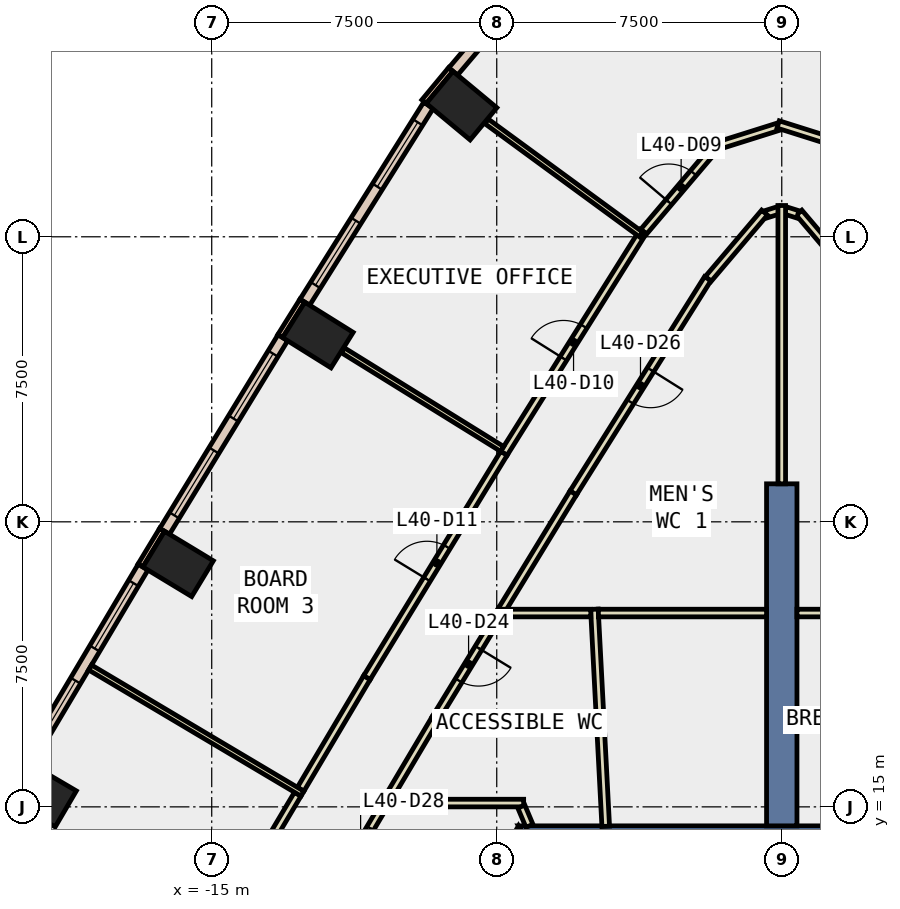
"""IFC4 building model, lengths in metres.
Left out: names, types, materials, properties, quantities, classifications, styles, units other than length and angle.
Written with IfcOpenShell. Run it as: python <this file> out.ifc"""

import sys

from ifc_helpers import new_model, si_unit, direction, frame, frame_2d, origin, origin_2d, place, context, subcontext, project, spatial, polyline, rectangle, outline, extrude, element, fill, save


model = new_model("IFC4")
c1 = context("Model", 3, precision=1e-05, world=origin(), true_north=direction((0.0, 1.0)))
c2 = subcontext(c1, "Body", "Model", "MODEL_VIEW")
j1 = project(units=[si_unit("LENGTHUNIT", "METRE"), si_unit("PLANEANGLEUNIT", "RADIAN")], contexts=[c1])
p1 = place(None, origin())
s1 = spatial("IfcSite", under=j1, at=p1, CompositionType="ELEMENT")
p2 = place(p1, origin())
s2 = spatial("IfcBuilding", under=s1, at=p2, CompositionType="ELEMENT")
p3 = place(p2, frame((0.0, 0.0, 180.2)))
s3 = spatial("IfcBuildingStorey", under=s2, at=p3, CompositionType="ELEMENT", Elevation=180.2)
for number, where, z_axis, x_axis in (
    (1, (-8.426, 33.452, -0.4), (0.0, 0.0, 1.0), (0.639, 0.769, 0.0)),
    (2, (-12.206, 27.416, -0.4), (0.0, 0.0, 1.0), (0.53, 0.848, 0.0)),
    (3, (-15.884, 21.393, -0.4), (0.0, 0.0, 1.0), (0.518, 0.855, 0.0)),
    (4, (-19.488, 15.326, -0.4), (0.0, 0.0, 1.0), (0.506, 0.863, 0.0)),
):
    element("IfcColumn", number, at=place(p3, frame(where, z_axis=z_axis, x_axis=x_axis)), inside=s3, PredefinedType="COLUMN", context=c2, shape_type="SweptSolid", body=[
        extrude(rectangle(XDim=1.1, YDim=1.5, at=origin_2d()), origin(), (0.0, 0.0, 1.0), 4.0),
    ])
p4 = place(p3, frame((0.0, 0.0, -0.4)))
e5 = element("IfcWall", 5, at=p4, inside=s3, PredefinedType="SHEAR", context=c2, shape_type="SweptSolid", body=[
    extrude(outline(polyline([(6.928, 14.5), (-6.928, 14.5), (-6.351, 13.5), (6.351, 13.5), (6.928, 14.5)])), origin(), (0.0, 0.0, 1.0), 4.0),
])
p5 = place(p3, frame((0.0, 0.0, -0.4)))
e6 = element("IfcWall", 6, at=p5, inside=s3, PredefinedType="SHEAR", context=c2, shape_type="SweptSolid", body=[
    extrude(outline(polyline([(-12.267, 5.252), (-11.402, 4.752), (-6.351, 13.5), (-6.928, 14.5), (-12.267, 5.252)])), origin(), (0.0, 0.0, 1.0), 4.0),
])
p6 = place(p3, frame((0.0, 14.5, -0.4), z_axis=(0.0, 0.0, 1.0), x_axis=(0.0, 1.0, 0.0)))
e7 = element("IfcWall", 7, at=p6, inside=s3, PredefinedType="SHEAR", context=c2, shape_type="SweptSolid", body=[
    extrude(rectangle(XDim=9.0, YDim=0.8, at=frame_2d((4.5, 0.0))), origin(), (0.0, 0.0, 1.0), 4.0),
])
p7 = place(p3, frame((-8.709, 34.402, 0.0), z_axis=(0.0, 0.0, 1.0), x_axis=(-0.639092407347, -0.769129959676, 0.0)))
e8 = element("IfcWall", 8, at=p7, inside=s3, PredefinedType="STANDARD", context=c2, shape_type="SweptSolid", body=[
    extrude(rectangle(XDim=1.1, YDim=0.15, at=frame_2d((0.55, 0.0))), origin(), (0.0, 0.0, 1.0), 3.6),
])
p8 = place(p3, frame((-12.614, 28.32, 0.0), z_axis=(0.0, 0.0, 1.0), x_axis=(-0.529879262372, -0.848073090782, 0.0)))
e9 = element("IfcWall", 9, at=p8, inside=s3, PredefinedType="STANDARD", context=c2, shape_type="SweptSolid", body=[
    extrude(rectangle(XDim=1.1, YDim=0.15, at=frame_2d((0.55, 0.0))), origin(), (0.0, 0.0, 1.0), 3.6),
])
p9 = place(p3, frame((-16.305, 22.291, 0.0), z_axis=(0.0, 0.0, 1.0), x_axis=(-0.518178754102, -0.855272341888, 0.0)))
e10 = element("IfcWall", 10, at=p9, inside=s3, PredefinedType="STANDARD", context=c2, shape_type="SweptSolid", body=[
    extrude(rectangle(XDim=1.1, YDim=0.15, at=frame_2d((0.55, 0.0))), origin(), (0.0, 0.0, 1.0), 3.6),
])
p10 = place(p3, frame((-5.889, 37.599, 0.0), z_axis=(0.0, 0.0, 1.0), x_axis=(-0.647156077277, -0.76235753531, 0.0)))
e11 = element("IfcWall", 11, at=p10, inside=s3, PredefinedType="STANDARD", context=c2, shape_type="SweptSolid", body=[
    extrude(rectangle(XDim=4.262, YDim=0.3, at=frame_2d((2.131, 0.0))), origin(), (0.0, 0.0, 1.0), 3.6),
])
p11 = place(p10, frame((1.431, 0.0, 0.9)))
e12 = element("IfcOpeningElement", 12, at=p11, cuts=e11, PredefinedType="OPENING", context=c2, shape_type="SweptSolid", body=[
    extrude(rectangle(XDim=1.4, YDim=2.6, at=frame_2d((0.7, 1.3))), frame((0.0, 0.16, 0.0), z_axis=(0.0, -1.0, 0.0), x_axis=(1.0, 0.0, 0.0)), (0.0, 0.0, 1.0), 0.32),
])
p12 = place(p3, frame((-9.296, 33.461, 0.0), z_axis=(0.0, 0.0, 1.0), x_axis=(-0.531816047834, -0.846859900613, 0.0)))
e13 = element("IfcWall", 13, at=p12, inside=s3, PredefinedType="STANDARD", context=c2, shape_type="SweptSolid", body=[
    extrude(rectangle(XDim=6.119, YDim=0.3, at=frame_2d((3.06, 0.0))), origin(), (0.0, 0.0, 1.0), 3.6),
])
p13 = place(p12, frame((0.53, 0.0, 0.9)))
e14 = element("IfcOpeningElement", 14, at=p13, cuts=e13, PredefinedType="OPENING", context=c2, shape_type="SweptSolid", body=[
    extrude(rectangle(XDim=2.0, YDim=2.6, at=frame_2d((1.0, 1.3))), frame((0.0, 0.16, 0.0), z_axis=(0.0, -1.0, 0.0), x_axis=(1.0, 0.0, 0.0)), (0.0, 0.0, 1.0), 0.32),
])
p14 = place(p12, frame((3.589, 0.0, 0.9)))
e15 = element("IfcOpeningElement", 15, at=p14, cuts=e13, PredefinedType="OPENING", context=c2, shape_type="SweptSolid", body=[
    extrude(rectangle(XDim=2.0, YDim=2.6, at=frame_2d((1.0, 1.3))), frame((0.0, 0.16, 0.0), z_axis=(0.0, -1.0, 0.0), x_axis=(1.0, 0.0, 0.0)), (0.0, 0.0, 1.0), 0.32),
])
p15 = place(p3, frame((-13.128, 27.345, 0.0), z_axis=(0.0, 0.0, 1.0), x_axis=(-0.521263083766, -0.8533960379, 0.0)))
e16 = element("IfcWall", 16, at=p15, inside=s3, PredefinedType="STANDARD", context=c2, shape_type="SweptSolid", body=[
    extrude(rectangle(XDim=5.97, YDim=0.3, at=frame_2d((2.985, 0.0))), origin(), (0.0, 0.0, 1.0), 3.6),
])
p16 = place(p15, frame((0.493, 0.0, 0.9)))
e17 = element("IfcOpeningElement", 17, at=p16, cuts=e16, PredefinedType="OPENING", context=c2, shape_type="SweptSolid", body=[
    extrude(rectangle(XDim=2.0, YDim=2.6, at=frame_2d((1.0, 1.3))), frame((0.0, 0.16, 0.0), z_axis=(0.0, -1.0, 0.0), x_axis=(1.0, 0.0, 0.0)), (0.0, 0.0, 1.0), 0.32),
])
p17 = place(p15, frame((3.478, 0.0, 0.9)))
e18 = element("IfcOpeningElement", 18, at=p17, cuts=e16, PredefinedType="OPENING", context=c2, shape_type="SweptSolid", body=[
    extrude(rectangle(XDim=2.0, YDim=2.6, at=frame_2d((1.0, 1.3))), frame((0.0, 0.16, 0.0), z_axis=(0.0, -1.0, 0.0), x_axis=(1.0, 0.0, 0.0)), (0.0, 0.0, 1.0), 0.32),
])
p18 = place(p3, frame((-16.806, 21.309, 0.0), z_axis=(0.0, 0.0, 1.0), x_axis=(-0.510653096173, -0.859786842984, 0.0)))
e19 = element("IfcWall", 19, at=p18, inside=s3, PredefinedType="STANDARD", context=c2, shape_type="SweptSolid", body=[
    extrude(rectangle(XDim=5.969, YDim=0.3, at=frame_2d((2.984, 0.0))), origin(), (0.0, 0.0, 1.0), 3.6),
])
p19 = place(p18, frame((0.492, 0.0, 0.9)))
e20 = element("IfcOpeningElement", 20, at=p19, cuts=e19, PredefinedType="OPENING", context=c2, shape_type="SweptSolid", body=[
    extrude(rectangle(XDim=2.0, YDim=2.6, at=frame_2d((1.0, 1.3))), frame((0.0, 0.16, 0.0), z_axis=(0.0, -1.0, 0.0), x_axis=(1.0, 0.0, 0.0)), (0.0, 0.0, 1.0), 0.32),
])
p20 = place(p18, frame((3.477, 0.0, 0.9)))
e21 = element("IfcOpeningElement", 21, at=p20, cuts=e19, PredefinedType="OPENING", context=c2, shape_type="SweptSolid", body=[
    extrude(rectangle(XDim=2.0, YDim=2.6, at=frame_2d((1.0, 1.3))), frame((0.0, 0.16, 0.0), z_axis=(0.0, -1.0, 0.0), x_axis=(1.0, 0.0, 0.0)), (0.0, 0.0, 1.0), 0.32),
])
p21 = place(p3, frame((-10.484, 15.014, 0.0), z_axis=(0.0, 0.0, 1.0), x_axis=(-0.510627855782, -0.859801833506, 0.0)))
e22 = element("IfcWall", 22, at=p21, inside=s3, PredefinedType="PARTITIONING", context=c2, shape_type="SweptSolid", body=[
    extrude(rectangle(XDim=2.342, YDim=0.2, at=frame_2d((1.171, 0.0))), origin(), (0.0, 0.0, 1.0), 3.6),
])
p22 = place(p21, frame((0.671, 0.0, 0.0)))
e23 = element("IfcOpeningElement", 23, at=p22, cuts=e22, PredefinedType="OPENING", context=c2, shape_type="SweptSolid", body=[
    extrude(rectangle(XDim=1.0, YDim=2.1, at=frame_2d((0.5, 1.05))), frame((0.0, 0.11, 0.0), z_axis=(0.0, -1.0, 0.0), x_axis=(1.0, 0.0, 0.0)), (0.0, 0.0, 1.0), 0.22),
])
p23 = place(p3, frame((-7.365, 20.185, 0.0), z_axis=(0.0, 0.0, 1.0), x_axis=(-0.521352973407, -0.853341125881, 0.0)))
e24 = element("IfcWall", 24, at=p23, inside=s3, PredefinedType="PARTITIONING", context=c2, shape_type="SweptSolid", body=[
    extrude(rectangle(XDim=3.359, YDim=0.2, at=frame_2d((1.679, 0.0))), origin(), (0.0, 0.0, 1.0), 3.6),
])
p24 = place(p23, frame((1.18, 0.0, 0.0)))
e25 = element("IfcOpeningElement", 25, at=p24, cuts=e24, PredefinedType="OPENING", context=c2, shape_type="SweptSolid", body=[
    extrude(rectangle(XDim=1.0, YDim=2.1, at=frame_2d((0.5, 1.05))), frame((0.0, 0.11, 0.0), z_axis=(0.0, -1.0, 0.0), x_axis=(1.0, 0.0, 0.0)), (0.0, 0.0, 1.0), 0.22),
])
p25 = place(p3, frame((-9.116, 17.319, 0.0), z_axis=(0.0, 0.0, 1.0), x_axis=(-0.510422773569, -0.859923596735, 0.0)))
e26 = element("IfcWall", 26, at=p25, inside=s3, PredefinedType="PARTITIONING", context=c2, shape_type="SweptSolid", body=[
    extrude(rectangle(XDim=2.48, YDim=0.2, at=frame_2d((1.24, 0.0))), origin(), (0.0, 0.0, 1.0), 3.6),
])
p26 = place(p3, frame((1.936, 28.89, 0.0), z_axis=(0.0, 0.0, 1.0), x_axis=(-0.647388540773, 0.762160138866, 0.0)))
e27 = element("IfcWall", 27, at=p26, inside=s3, PredefinedType="PARTITIONING", context=c2, shape_type="SweptSolid", body=[
    extrude(rectangle(XDim=2.291, YDim=0.2, at=frame_2d((1.146, 0.0))), origin(), (0.0, 0.0, 1.0), 3.6),
])
p27 = place(p3, frame((0.423, 30.59, 0.0), z_axis=(0.0, 0.0, 1.0), x_axis=(-0.954074901128, 0.29956816092, 0.0)))
e28 = element("IfcWall", 28, at=p27, inside=s3, PredefinedType="PARTITIONING", context=c2, shape_type="SweptSolid", body=[
    extrude(rectangle(XDim=0.344, YDim=0.2, at=frame_2d((0.172, 0.0))), origin(), (0.0, 0.0, 1.0), 3.6),
])
p28 = place(p3, frame((-0.048, 30.708, 0.0), z_axis=(0.0, 0.0, 1.0), x_axis=(-0.953948026088, -0.299971937891, 0.0)))
e29 = element("IfcWall", 29, at=p28, inside=s3, PredefinedType="PARTITIONING", context=c2, shape_type="SweptSolid", body=[
    extrude(rectangle(XDim=0.393, YDim=0.2, at=frame_2d((0.197, 0.0))), origin(), (0.0, 0.0, 1.0), 3.6),
])
p29 = place(p3, frame((-0.453, 30.636, 0.0), z_axis=(0.0, 0.0, 1.0), x_axis=(-0.647388540773, -0.762160138866, 0.0)))
e30 = element("IfcWall", 30, at=p29, inside=s3, PredefinedType="PARTITIONING", context=c2, shape_type="SweptSolid", body=[
    extrude(rectangle(XDim=2.291, YDim=0.2, at=frame_2d((1.146, 0.0))), origin(), (0.0, 0.0, 1.0), 3.6),
])
p30 = place(p3, frame((-1.948, 28.898, 0.0), z_axis=(0.0, 0.0, 1.0), x_axis=(-0.531656179122, -0.846960274866, 0.0)))
e31 = element("IfcWall", 31, at=p30, inside=s3, PredefinedType="PARTITIONING", context=c2, shape_type="SweptSolid", body=[
    extrude(rectangle(XDim=6.657, YDim=0.2, at=frame_2d((3.328, 0.0))), origin(), (0.0, 0.0, 1.0), 3.6),
])
p31 = place(p30, frame((2.828, 0.0, 0.0)))
e32 = element("IfcOpeningElement", 32, at=p31, cuts=e31, PredefinedType="OPENING", context=c2, shape_type="SweptSolid", body=[
    extrude(rectangle(XDim=1.0, YDim=2.1, at=frame_2d((0.5, 1.05))), frame((0.0, 0.11, 0.0), z_axis=(0.0, -1.0, 0.0), x_axis=(1.0, 0.0, 0.0)), (0.0, 0.0, 1.0), 0.22),
])
p32 = place(p3, frame((-5.487, 23.26, 0.0), z_axis=(0.0, 0.0, 1.0), x_axis=(-0.521206053955, -0.853430869679, 0.0)))
e33 = element("IfcWall", 33, at=p32, inside=s3, PredefinedType="PARTITIONING", context=c2, shape_type="SweptSolid", body=[
    extrude(rectangle(XDim=3.603, YDim=0.2, at=frame_2d((1.802, 0.0))), origin(), (0.0, 0.0, 1.0), 3.6),
])
p33 = place(p3, frame((-3.634, 30.134, 0.0), z_axis=(0.0, 0.0, 1.0), x_axis=(0.647148242723, 0.762364185899, 0.0)))
e34 = element("IfcWall", 34, at=p33, inside=s3, PredefinedType="PARTITIONING", context=c2, shape_type="SweptSolid", body=[
    extrude(rectangle(XDim=3.047, YDim=0.2, at=frame_2d((1.523, 0.0))), origin(), (0.0, 0.0, 1.0), 3.6),
])
p34 = place(p33, frame((1.024, 0.0, 0.0)))
e35 = element("IfcOpeningElement", 35, at=p34, cuts=e34, PredefinedType="OPENING", context=c2, shape_type="SweptSolid", body=[
    extrude(rectangle(XDim=1.0, YDim=2.1, at=frame_2d((0.5, 1.05))), frame((0.0, 0.11, 0.0), z_axis=(0.0, -1.0, 0.0), x_axis=(1.0, 0.0, 0.0)), (0.0, 0.0, 1.0), 0.22),
])
p35 = place(p3, frame((-1.632, 32.411, 0.0), z_axis=(0.0, 0.0, 1.0), x_axis=(0.953809064266, 0.300413496575, 0.0)))
e36 = element("IfcWall", 36, at=p35, inside=s3, PredefinedType="PARTITIONING", context=c2, shape_type="SweptSolid", body=[
    extrude(rectangle(XDim=1.612, YDim=0.2, at=frame_2d((0.806, 0.0))), origin(), (0.0, 0.0, 1.0), 3.6),
])
p36 = place(p3, frame((-0.095, 32.956, 0.0), z_axis=(0.0, 0.0, 1.0), x_axis=(0.953617294109, -0.301021687552, 0.0)))
e37 = element("IfcWall", 37, at=p36, inside=s3, PredefinedType="PARTITIONING", context=c2, shape_type="SweptSolid", body=[
    extrude(rectangle(XDim=1.811, YDim=0.2, at=frame_2d((0.906, 0.0))), origin(), (0.0, 0.0, 1.0), 3.6),
])
p37 = place(p3, frame((-7.312, 24.302, 0.0), z_axis=(0.0, 0.0, 1.0), x_axis=(0.53166241737, 0.846956358944, 0.0)))
e38 = element("IfcWall", 38, at=p37, inside=s3, PredefinedType="PARTITIONING", context=c2, shape_type="SweptSolid", body=[
    extrude(rectangle(XDim=6.895, YDim=0.2, at=frame_2d((3.448, 0.0))), origin(), (0.0, 0.0, 1.0), 3.6),
])
p38 = place(p37, frame((2.948, 0.0, 0.0)))
e39 = element("IfcOpeningElement", 39, at=p38, cuts=e38, PredefinedType="OPENING", context=c2, shape_type="SweptSolid", body=[
    extrude(rectangle(XDim=1.0, YDim=2.1, at=frame_2d((0.5, 1.05))), frame((0.0, 0.11, 0.0), z_axis=(0.0, -1.0, 0.0), x_axis=(1.0, 0.0, 0.0)), (0.0, 0.0, 1.0), 0.22),
])
p39 = place(p3, frame((-12.66, 15.463, 0.0), z_axis=(0.0, 0.0, 1.0), x_axis=(0.510477693133, 0.85989099589, 0.0)))
e40 = element("IfcWall", 40, at=p39, inside=s3, PredefinedType="PARTITIONING", context=c2, shape_type="SweptSolid", body=[
    extrude(rectangle(XDim=3.418, YDim=0.2, at=frame_2d((1.709, 0.0))), origin(), (0.0, 0.0, 1.0), 3.6),
])
p40 = place(p3, frame((-10.915, 18.402, 0.0), z_axis=(0.0, 0.0, 1.0), x_axis=(0.521189997761, 0.853440675287, 0.0)))
e41 = element("IfcWall", 41, at=p40, inside=s3, PredefinedType="PARTITIONING", context=c2, shape_type="SweptSolid", body=[
    extrude(rectangle(XDim=6.913, YDim=0.2, at=frame_2d((3.457, 0.0))), origin(), (0.0, 0.0, 1.0), 3.6),
])
p41 = place(p40, frame((3.031, 0.0, 0.0)))
e42 = element("IfcOpeningElement", 42, at=p41, cuts=e41, PredefinedType="OPENING", context=c2, shape_type="SweptSolid", body=[
    extrude(rectangle(XDim=1.0, YDim=2.1, at=frame_2d((0.5, 1.05))), frame((0.0, 0.11, 0.0), z_axis=(0.0, -1.0, 0.0), x_axis=(1.0, 0.0, 0.0)), (0.0, 0.0, 1.0), 0.22),
])
p42 = place(p3, frame((-14.482, 12.395, 0.0), z_axis=(0.0, 0.0, 1.0), x_axis=(0.51050904729, 0.859872381598, 0.0)))
e43 = element("IfcWall", 43, at=p42, inside=s3, PredefinedType="PARTITIONING", context=c2, shape_type="SweptSolid", body=[
    extrude(rectangle(XDim=3.418, YDim=0.2, at=frame_2d((1.709, 0.0))), origin(), (0.0, 0.0, 1.0), 3.6),
])
p43 = place(p3, frame((-6.792, 15.1, 0.0), z_axis=(0.0, 0.0, 1.0), x_axis=(-1.0, 0.0, 0.0)))
e44 = element("IfcWall", 44, at=p43, inside=s3, PredefinedType="PARTITIONING", context=c2, shape_type="SweptSolid", body=[
    extrude(rectangle(XDim=3.741, YDim=0.2, at=frame_2d((1.871, 0.0))), origin(), (0.0, 0.0, 1.0), 3.6),
])
p44 = place(p3, frame((-6.639, 14.5, 0.0), z_axis=(0.0, 0.0, 1.0), x_axis=(-0.388353930402, 0.921510295516, 0.0)))
e45 = element("IfcWall", 45, at=p44, inside=s3, PredefinedType="PARTITIONING", context=c2, shape_type="SweptSolid", body=[
    extrude(rectangle(XDim=0.551, YDim=0.2, at=frame_2d((0.276, 0.0))), origin(), (0.0, 0.0, 1.0), 3.6),
])
p45 = place(p3, frame((-4.632, 14.488, 0.0), z_axis=(0.0, 0.0, 1.0), x_axis=(-0.052074913706, 0.998643181203, 0.0)))
e46 = element("IfcWall", 46, at=p45, inside=s3, PredefinedType="PARTITIONING", context=c2, shape_type="SweptSolid", body=[
    extrude(rectangle(XDim=5.72, YDim=0.2, at=frame_2d((2.86, 0.0))), origin(), (0.0, 0.0, 1.0), 3.6),
])
p46 = place(p3, frame((0.4, 20.1, 0.0), z_axis=(0.0, 0.0, 1.0), x_axis=(1.0, 0.0, 0.0)))
e47 = element("IfcWall", 47, at=p46, inside=s3, PredefinedType="PARTITIONING", context=c2, shape_type="SweptSolid", body=[
    extrude(rectangle(XDim=7.117, YDim=0.2, at=frame_2d((3.559, 0.0))), origin(), (0.0, 0.0, 1.0), 3.6),
])
p47 = place(p3, frame((-4.825, 20.1, 0.0), z_axis=(0.0, 0.0, 1.0), x_axis=(1.0, 0.0, 0.0)))
e48 = element("IfcWall", 48, at=p47, inside=s3, PredefinedType="PARTITIONING", context=c2, shape_type="SweptSolid", body=[
    extrude(rectangle(XDim=4.425, YDim=0.2, at=frame_2d((2.212, 0.0))), origin(), (0.0, 0.0, 1.0), 3.6),
])
p48 = place(p3, frame((-7.317, 20.1, 0.0), z_axis=(0.0, 0.0, 1.0), x_axis=(1.0, 0.0, 0.0)))
e49 = element("IfcWall", 49, at=p48, inside=s3, PredefinedType="PARTITIONING", context=c2, shape_type="SweptSolid", body=[
    extrude(rectangle(XDim=2.292, YDim=0.2, at=frame_2d((1.146, 0.0))), origin(), (0.0, 0.0, 1.0), 3.6),
])
p49 = place(p3, frame((0.0, 23.5, 0.0), z_axis=(0.0, 0.0, 1.0), x_axis=(0.0, 1.0, 0.0)))
e50 = element("IfcWall", 50, at=p49, inside=s3, PredefinedType="PARTITIONING", context=c2, shape_type="SweptSolid", body=[
    extrude(rectangle(XDim=7.323, YDim=0.2, at=frame_2d((3.662, 0.0))), origin(), (0.0, 0.0, 1.0), 3.6),
])
p50 = place(p3, frame((-3.699, 30.058, 0.0), z_axis=(0.0, 0.0, 1.0), x_axis=(-0.806852521394, 0.59075291681, 0.0)))
e51 = element("IfcWall", 51, at=p50, inside=s3, PredefinedType="PARTITIONING", context=c2, shape_type="SweptSolid", body=[
    extrude(rectangle(XDim=5.044, YDim=0.15, at=frame_2d((2.522, 0.0))), origin(), (0.0, 0.0, 1.0), 3.6),
])
p51 = place(p3, frame((-7.358, 24.418, 0.0), z_axis=(0.0, 0.0, 1.0), x_axis=(-0.850136365231, 0.526562589358, 0.0)))
e52 = element("IfcWall", 52, at=p51, inside=s3, PredefinedType="PARTITIONING", context=c2, shape_type="SweptSolid", body=[
    extrude(rectangle(XDim=4.93, YDim=0.15, at=frame_2d((2.465, 0.0))), origin(), (0.0, 0.0, 1.0), 3.6),
])
p52 = place(p3, frame((-12.613, 15.348, 0.0), z_axis=(0.0, 0.0, 1.0), x_axis=(-0.85976815765, 0.510684555368, 0.0)))
e53 = element("IfcWall", 53, at=p52, inside=s3, PredefinedType="PARTITIONING", context=c2, shape_type="SweptSolid", body=[
    extrude(rectangle(XDim=6.499, YDim=0.15, at=frame_2d((3.25, 0.0))), origin(), (0.0, 0.0, 1.0), 3.6),
])
p53 = place(p13, origin())
e54 = element("IfcWindow", 54, at=p53, inside=s3, PartitioningType="SINGLE_PANEL", PredefinedType="WINDOW", context=c2, shape_type="SweptSolid", body=[
    extrude(rectangle(XDim=2.0, YDim=2.6, at=frame_2d((1.0, 1.3))), frame((0.0, 0.03, 0.0), z_axis=(0.0, -1.0, 0.0), x_axis=(1.0, 0.0, 0.0)), (0.0, 0.0, 1.0), 0.06),
])
fill(e14, e54)
p54 = place(p14, origin())
e55 = element("IfcWindow", 55, at=p54, inside=s3, PartitioningType="SINGLE_PANEL", PredefinedType="WINDOW", context=c2, shape_type="SweptSolid", body=[
    extrude(rectangle(XDim=2.0, YDim=2.6, at=frame_2d((1.0, 1.3))), frame((0.0, 0.03, 0.0), z_axis=(0.0, -1.0, 0.0), x_axis=(1.0, 0.0, 0.0)), (0.0, 0.0, 1.0), 0.06),
])
fill(e15, e55)
p55 = place(p16, origin())
e56 = element("IfcWindow", 56, at=p55, inside=s3, PartitioningType="SINGLE_PANEL", PredefinedType="WINDOW", context=c2, shape_type="SweptSolid", body=[
    extrude(rectangle(XDim=2.0, YDim=2.6, at=frame_2d((1.0, 1.3))), frame((0.0, 0.03, 0.0), z_axis=(0.0, -1.0, 0.0), x_axis=(1.0, 0.0, 0.0)), (0.0, 0.0, 1.0), 0.06),
])
fill(e17, e56)
p56 = place(p17, origin())
e57 = element("IfcWindow", 57, at=p56, inside=s3, PartitioningType="SINGLE_PANEL", PredefinedType="WINDOW", context=c2, shape_type="SweptSolid", body=[
    extrude(rectangle(XDim=2.0, YDim=2.6, at=frame_2d((1.0, 1.3))), frame((0.0, 0.03, 0.0), z_axis=(0.0, -1.0, 0.0), x_axis=(1.0, 0.0, 0.0)), (0.0, 0.0, 1.0), 0.06),
])
fill(e18, e57)
p57 = place(p19, origin())
e58 = element("IfcWindow", 58, at=p57, inside=s3, PartitioningType="SINGLE_PANEL", PredefinedType="WINDOW", context=c2, shape_type="SweptSolid", body=[
    extrude(rectangle(XDim=2.0, YDim=2.6, at=frame_2d((1.0, 1.3))), frame((0.0, 0.03, 0.0), z_axis=(0.0, -1.0, 0.0), x_axis=(1.0, 0.0, 0.0)), (0.0, 0.0, 1.0), 0.06),
])
fill(e20, e58)
p58 = place(p20, origin())
e59 = element("IfcWindow", 59, at=p58, inside=s3, PartitioningType="SINGLE_PANEL", PredefinedType="WINDOW", context=c2, shape_type="SweptSolid", body=[
    extrude(rectangle(XDim=2.0, YDim=2.6, at=frame_2d((1.0, 1.3))), frame((0.0, 0.03, 0.0), z_axis=(0.0, -1.0, 0.0), x_axis=(1.0, 0.0, 0.0)), (0.0, 0.0, 1.0), 0.06),
])
fill(e21, e59)
p59 = place(p34, origin())
e60 = element("IfcDoor", 60, at=p59, inside=s3, OperationType="SINGLE_SWING_LEFT", PredefinedType="DOOR", context=c2, shape_type="SweptSolid", body=[
    extrude(rectangle(XDim=1.0, YDim=2.1, at=frame_2d((0.5, 1.05))), frame((0.0, 0.025, 0.0), z_axis=(0.0, -1.0, 0.0), x_axis=(1.0, 0.0, 0.0)), (0.0, 0.0, 1.0), 0.05),
])
fill(e35, e60)
p60 = place(p38, origin())
e61 = element("IfcDoor", 61, at=p60, inside=s3, OperationType="SINGLE_SWING_LEFT", PredefinedType="DOOR", context=c2, shape_type="SweptSolid", body=[
    extrude(rectangle(XDim=1.0, YDim=2.1, at=frame_2d((0.5, 1.05))), frame((0.0, 0.025, 0.0), z_axis=(0.0, -1.0, 0.0), x_axis=(1.0, 0.0, 0.0)), (0.0, 0.0, 1.0), 0.05),
])
fill(e39, e61)
p61 = place(p41, origin())
e62 = element("IfcDoor", 62, at=p61, inside=s3, OperationType="SINGLE_SWING_RIGHT", PredefinedType="DOOR", context=c2, shape_type="SweptSolid", body=[
    extrude(rectangle(XDim=1.0, YDim=2.1, at=frame_2d((0.5, 1.05))), frame((0.0, 0.025, 0.0), z_axis=(0.0, -1.0, 0.0), x_axis=(1.0, 0.0, 0.0)), (0.0, 0.0, 1.0), 0.05),
])
fill(e42, e62)
p62 = place(p24, origin())
e63 = element("IfcDoor", 63, at=p62, inside=s3, OperationType="SINGLE_SWING_LEFT", PredefinedType="DOOR", context=c2, shape_type="SweptSolid", body=[
    extrude(rectangle(XDim=1.0, YDim=2.1, at=frame_2d((0.5, 1.05))), frame((0.0, 0.025, 0.0), z_axis=(0.0, -1.0, 0.0), x_axis=(1.0, 0.0, 0.0)), (0.0, 0.0, 1.0), 0.05),
])
fill(e25, e63)
p63 = place(p31, origin())
e64 = element("IfcDoor", 64, at=p63, inside=s3, OperationType="SINGLE_SWING_LEFT", PredefinedType="DOOR", context=c2, shape_type="SweptSolid", body=[
    extrude(rectangle(XDim=1.0, YDim=2.1, at=frame_2d((0.5, 1.05))), frame((0.0, 0.025, 0.0), z_axis=(0.0, -1.0, 0.0), x_axis=(1.0, 0.0, 0.0)), (0.0, 0.0, 1.0), 0.05),
])
fill(e32, e64)
p64 = place(p22, origin())
e65 = element("IfcDoor", 65, at=p64, inside=s3, OperationType="SINGLE_SWING_LEFT", PredefinedType="DOOR", context=c2, shape_type="SweptSolid", body=[
    extrude(rectangle(XDim=1.0, YDim=2.1, at=frame_2d((0.5, 1.05))), frame((0.0, 0.025, 0.0), z_axis=(0.0, -1.0, 0.0), x_axis=(1.0, 0.0, 0.0)), (0.0, 0.0, 1.0), 0.05),
])
fill(e23, e65)
save(model, sys.argv[1])
